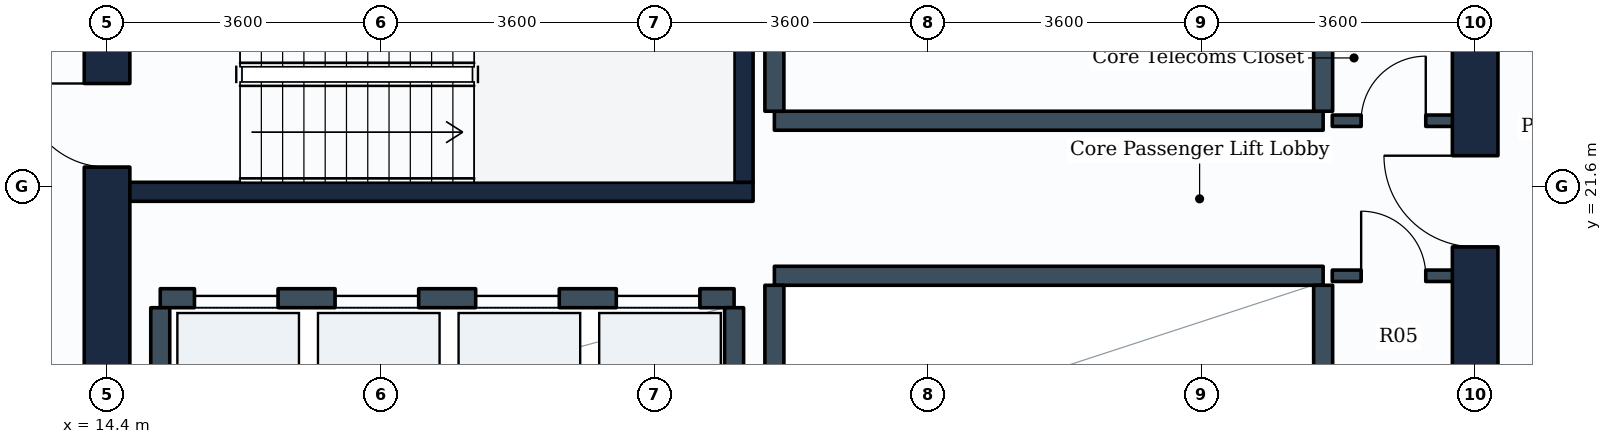
"""IFC4 building model, lengths in metres.
Left out: names, types, materials, properties, quantities, classifications, styles, units other than length and angle.
Written with IfcOpenShell. Run it as: python <this file> out.ifc"""

import sys

from ifc_helpers import new_model, si_unit, direction, frame, frame_2d, origin, place, context, subcontext, project, spatial, rectangle, extrude, element, fill, save


model = new_model("IFC4")
c1 = context("Model", 3, precision=1e-05, world=origin(), true_north=direction((0.0, 1.0)))
c2 = subcontext(c1, "Body", "Model", "MODEL_VIEW")
j1 = project(units=[si_unit("LENGTHUNIT", "METRE"), si_unit("PLANEANGLEUNIT", "RADIAN")], contexts=[c1])
p1 = place(None, origin())
s1 = spatial("IfcSite", under=j1, at=p1, CompositionType="ELEMENT")
p2 = place(p1, origin())
s2 = spatial("IfcBuilding", under=s1, at=p2, CompositionType="ELEMENT")
p3 = place(p2, frame((0.0, 0.0, 47.4)))
s3 = spatial("IfcBuildingStorey", under=s2, at=p3, CompositionType="ELEMENT", Elevation=47.4)
p4 = place(p3, frame((14.4, 10.8, 0.0), z_axis=(0.0, 0.0, 1.0), x_axis=(0.0, 1.0, 0.0)))
e1 = element("IfcWall", 1, at=p4, inside=s3, PredefinedType="SHEAR", context=c2, shape_type="SweptSolid", body=[
    extrude(rectangle(XDim=14.4, YDim=0.6, at=frame_2d((7.2, 0.0))), origin(), (0.0, 0.0, 1.0), 3.65),
])
p5 = place(p4, frame((11.05, 0.0, 0.0)))
e2 = element("IfcOpeningElement", 2, at=p5, cuts=e1, PredefinedType="OPENING", context=c2, shape_type="SweptSolid", body=[
    extrude(rectangle(XDim=1.1, YDim=2.1, at=frame_2d((0.55, 1.05))), frame((0.0, 0.31, 0.0), z_axis=(0.0, -1.0, 0.0), x_axis=(1.0, 0.0, 0.0)), (0.0, 0.0, 1.0), 0.62),
])
p6 = place(p4, frame((4.9, 0.0, 0.0)))
e3 = element("IfcOpeningElement", 3, at=p6, cuts=e1, PredefinedType="OPENING", context=c2, shape_type="SweptSolid", body=[
    extrude(rectangle(XDim=1.2, YDim=2.1, at=frame_2d((0.6, 1.05))), frame((0.0, 0.31, 0.0), z_axis=(0.0, -1.0, 0.0), x_axis=(1.0, 0.0, 0.0)), (0.0, 0.0, 1.0), 0.62),
])
p7 = place(p3, frame((32.4, 10.8, 0.0), z_axis=(0.0, 0.0, 1.0), x_axis=(0.0, 1.0, 0.0)))
e4 = element("IfcWall", 4, at=p7, inside=s3, PredefinedType="SHEAR", context=c2, shape_type="SweptSolid", body=[
    extrude(rectangle(XDim=14.4, YDim=0.6, at=frame_2d((7.2, 0.0))), origin(), (0.0, 0.0, 1.0), 3.65),
])
p8 = place(p7, frame((4.35, 0.0, 0.0)))
e5 = element("IfcOpeningElement", 5, at=p8, cuts=e4, PredefinedType="OPENING", context=c2, shape_type="SweptSolid", body=[
    extrude(rectangle(XDim=1.2, YDim=2.1, at=frame_2d((0.6, 1.05))), frame((0.0, 0.31, 0.0), z_axis=(0.0, -1.0, 0.0), x_axis=(1.0, 0.0, 0.0)), (0.0, 0.0, 1.0), 0.62),
])
p9 = place(p7, frame((10.0, 0.0, 0.0)))
e6 = element("IfcOpeningElement", 6, at=p9, cuts=e4, PredefinedType="OPENING", context=c2, shape_type="SweptSolid", body=[
    extrude(rectangle(XDim=1.2, YDim=2.1, at=frame_2d((0.6, 1.05))), frame((0.0, 0.31, 0.0), z_axis=(0.0, -1.0, 0.0), x_axis=(1.0, 0.0, 0.0)), (0.0, 0.0, 1.0), 0.62),
])
p10 = place(p3, frame((14.7, 21.525, 0.0), z_axis=(0.0, 0.0, 1.0), x_axis=(1.0, 0.0, 0.0)))
e7 = element("IfcWall", 7, at=p10, inside=s3, PredefinedType="SHEAR", context=c2, shape_type="SweptSolid", body=[
    extrude(rectangle(XDim=8.2, YDim=0.25, at=frame_2d((4.1, 0.0))), origin(), (0.0, 0.0, 1.0), 3.65),
])
p11 = place(p3, frame((22.775, 21.65, 0.0), z_axis=(0.0, 0.0, 1.0), x_axis=(0.0, 1.0, 0.0)))
e8 = element("IfcWall", 8, at=p11, inside=s3, PredefinedType="SHEAR", context=c2, shape_type="SweptSolid", body=[
    extrude(rectangle(XDim=2.84, YDim=0.25, at=frame_2d((1.42, 0.0))), origin(), (0.0, 0.0, 1.0), 3.65),
])
p12 = place(p3, frame((15.1, 20.125, 0.0), z_axis=(0.0, 0.0, 1.0), x_axis=(1.0, 0.0, 0.0)))
e9 = element("IfcWall", 9, at=p12, inside=s3, PredefinedType="PARTITIONING", context=c2, shape_type="SweptSolid", body=[
    extrude(rectangle(XDim=7.55, YDim=0.25, at=frame_2d((3.775, 0.0))), origin(), (0.0, 0.0, 1.0), 3.635),
])
p13 = place(p12, frame((0.45, 0.0, 0.0)))
e10 = element("IfcOpeningElement", 10, at=p13, cuts=e9, PredefinedType="OPENING", context=c2, shape_type="SweptSolid", body=[
    extrude(rectangle(XDim=1.1, YDim=2.1, at=frame_2d((0.55, 1.05))), frame((0.0, 0.135, 0.0), z_axis=(0.0, -1.0, 0.0), x_axis=(1.0, 0.0, 0.0)), (0.0, 0.0, 1.0), 0.27),
])
p14 = place(p12, frame((2.3, 0.0, 0.0)))
e11 = element("IfcOpeningElement", 11, at=p14, cuts=e9, PredefinedType="OPENING", context=c2, shape_type="SweptSolid", body=[
    extrude(rectangle(XDim=1.1, YDim=2.1, at=frame_2d((0.55, 1.05))), frame((0.0, 0.135, 0.0), z_axis=(0.0, -1.0, 0.0), x_axis=(1.0, 0.0, 0.0)), (0.0, 0.0, 1.0), 0.27),
])
p15 = place(p12, frame((4.15, 0.0, 0.0)))
e12 = element("IfcOpeningElement", 12, at=p15, cuts=e9, PredefinedType="OPENING", context=c2, shape_type="SweptSolid", body=[
    extrude(rectangle(XDim=1.1, YDim=2.1, at=frame_2d((0.55, 1.05))), frame((0.0, 0.135, 0.0), z_axis=(0.0, -1.0, 0.0), x_axis=(1.0, 0.0, 0.0)), (0.0, 0.0, 1.0), 0.27),
])
p16 = place(p12, frame((6.0, 0.0, 0.0)))
e13 = element("IfcOpeningElement", 13, at=p16, cuts=e9, PredefinedType="OPENING", context=c2, shape_type="SweptSolid", body=[
    extrude(rectangle(XDim=1.1, YDim=2.1, at=frame_2d((0.55, 1.05))), frame((0.0, 0.135, 0.0), z_axis=(0.0, -1.0, 0.0), x_axis=(1.0, 0.0, 0.0)), (0.0, 0.0, 1.0), 0.27),
])
for number, where, z_axis, x_axis in (
    (14, (15.1, 18.025, 0.0), (0.0, 0.0, 1.0), (0.0, 1.0, 0.0)),
    (15, (22.65, 18.025, 0.0), (0.0, 0.0, 1.0), (0.0, 1.0, 0.0)),
):
    element("IfcWall", number, at=place(p3, frame(where, z_axis=z_axis, x_axis=x_axis)), inside=s3, PredefinedType="PARTITIONING", context=c2, shape_type="SweptSolid", body=[
        extrude(rectangle(XDim=1.975, YDim=0.25, at=frame_2d((0.988, 0.0))), origin(), (0.0, 0.0, 1.0), 3.635),
    ])
p17 = place(p3, frame((23.18, 20.42, 0.0), z_axis=(0.0, 0.0, 1.0), x_axis=(1.0, 0.0, 0.0)))
e16 = element("IfcWall", 16, at=p17, inside=s3, PredefinedType="PARTITIONING", context=c2, shape_type="SweptSolid", body=[
    extrude(rectangle(XDim=7.22, YDim=0.25, at=frame_2d((3.61, 0.0))), origin(), (0.0, 0.0, 1.0), 3.635),
])
for number, where, z_axis, x_axis in (
    (17, (23.18, 18.025, 0.0), (0.0, 0.0, 1.0), (0.0, 1.0, 0.0)),
    (18, (30.4, 18.025, 0.0), (0.0, 0.0, 1.0), (0.0, 1.0, 0.0)),
):
    element("IfcWall", number, at=place(p3, frame(where, z_axis=z_axis, x_axis=x_axis)), inside=s3, PredefinedType="PARTITIONING", context=c2, shape_type="SweptSolid", body=[
        extrude(rectangle(XDim=2.27, YDim=0.25, at=frame_2d((1.135, 0.0))), origin(), (0.0, 0.0, 1.0), 3.635),
    ])
p18 = place(p3, frame((23.18, 22.46, 0.0), z_axis=(0.0, 0.0, 1.0), x_axis=(1.0, 0.0, 0.0)))
e19 = element("IfcWall", 19, at=p18, inside=s3, PredefinedType="PARTITIONING", context=c2, shape_type="SweptSolid", body=[
    extrude(rectangle(XDim=7.22, YDim=0.25, at=frame_2d((3.61, 0.0))), origin(), (0.0, 0.0, 1.0), 3.635),
])
for number, where, z_axis, x_axis in (
    (20, (23.18, 22.585, 0.0), (0.0, 0.0, 1.0), (0.0, 1.0, 0.0)),
    (21, (30.4, 22.585, 0.0), (0.0, 0.0, 1.0), (0.0, 1.0, 0.0)),
):
    element("IfcWall", number, at=place(p3, frame(where, z_axis=z_axis, x_axis=x_axis)), inside=s3, PredefinedType="PARTITIONING", context=c2, shape_type="SweptSolid", body=[
        extrude(rectangle(XDim=2.315, YDim=0.25, at=frame_2d((1.157, 0.0))), origin(), (0.0, 0.0, 1.0), 3.635),
    ])
p19 = place(p3, frame((30.52, 22.46, 0.0), z_axis=(0.0, 0.0, 1.0), x_axis=(1.0, 0.0, 0.0)))
e22 = element("IfcWall", 22, at=p19, inside=s3, PredefinedType="PARTITIONING", context=c2, shape_type="SweptSolid", body=[
    extrude(rectangle(XDim=1.63, YDim=0.15, at=frame_2d((0.815, 0.0))), origin(), (0.0, 0.0, 1.0), 3.635),
])
p20 = place(p19, frame((0.38, 0.0, 0.0)))
e23 = element("IfcOpeningElement", 23, at=p20, cuts=e22, PredefinedType="OPENING", context=c2, shape_type="SweptSolid", body=[
    extrude(rectangle(XDim=0.85, YDim=2.1, at=frame_2d((0.425, 1.05))), frame((0.0, 0.085, 0.0), z_axis=(0.0, -1.0, 0.0), x_axis=(1.0, 0.0, 0.0)), (0.0, 0.0, 1.0), 0.17),
])
p21 = place(p3, frame((30.52, 20.42, 0.0), z_axis=(0.0, 0.0, 1.0), x_axis=(1.0, 0.0, 0.0)))
e24 = element("IfcWall", 24, at=p21, inside=s3, PredefinedType="PARTITIONING", context=c2, shape_type="SweptSolid", body=[
    extrude(rectangle(XDim=1.63, YDim=0.15, at=frame_2d((0.815, 0.0))), origin(), (0.0, 0.0, 1.0), 3.635),
])
p22 = place(p21, frame((0.38, 0.0, 0.0)))
e25 = element("IfcOpeningElement", 25, at=p22, cuts=e24, PredefinedType="OPENING", context=c2, shape_type="SweptSolid", body=[
    extrude(rectangle(XDim=0.85, YDim=2.1, at=frame_2d((0.425, 1.05))), frame((0.0, 0.085, 0.0), z_axis=(0.0, -1.0, 0.0), x_axis=(1.0, 0.0, 0.0)), (0.0, 0.0, 1.0), 0.17),
])
p23 = place(p5, origin())
e26 = element("IfcDoor", 26, at=p23, inside=s3, OperationType="SINGLE_SWING_RIGHT", PredefinedType="DOOR", context=c2, shape_type="SweptSolid", body=[
    extrude(rectangle(XDim=1.1, YDim=2.1, at=frame_2d((0.55, 1.05))), frame((0.0, 0.025, 0.0), z_axis=(0.0, -1.0, 0.0), x_axis=(1.0, 0.0, 0.0)), (0.0, 0.0, 1.0), 0.05),
])
fill(e2, e26)
p24 = place(p13, origin())
e27 = element("IfcDoor", 27, at=p24, inside=s3, OperationType="SLIDING_TO_LEFT", PredefinedType="DOOR", context=c2, shape_type="SweptSolid", body=[
    extrude(rectangle(XDim=1.1, YDim=2.1, at=frame_2d((0.55, 1.05))), frame((0.0, 0.025, 0.0), z_axis=(0.0, -1.0, 0.0), x_axis=(1.0, 0.0, 0.0)), (0.0, 0.0, 1.0), 0.05),
])
fill(e10, e27)
p25 = place(p14, origin())
e28 = element("IfcDoor", 28, at=p25, inside=s3, OperationType="SLIDING_TO_LEFT", PredefinedType="DOOR", context=c2, shape_type="SweptSolid", body=[
    extrude(rectangle(XDim=1.1, YDim=2.1, at=frame_2d((0.55, 1.05))), frame((0.0, 0.025, 0.0), z_axis=(0.0, -1.0, 0.0), x_axis=(1.0, 0.0, 0.0)), (0.0, 0.0, 1.0), 0.05),
])
fill(e11, e28)
p26 = place(p15, origin())
e29 = element("IfcDoor", 29, at=p26, inside=s3, OperationType="SLIDING_TO_LEFT", PredefinedType="DOOR", context=c2, shape_type="SweptSolid", body=[
    extrude(rectangle(XDim=1.1, YDim=2.1, at=frame_2d((0.55, 1.05))), frame((0.0, 0.025, 0.0), z_axis=(0.0, -1.0, 0.0), x_axis=(1.0, 0.0, 0.0)), (0.0, 0.0, 1.0), 0.05),
])
fill(e12, e29)
p27 = place(p16, origin())
e30 = element("IfcDoor", 30, at=p27, inside=s3, OperationType="SLIDING_TO_LEFT", PredefinedType="DOOR", context=c2, shape_type="SweptSolid", body=[
    extrude(rectangle(XDim=1.1, YDim=2.1, at=frame_2d((0.55, 1.05))), frame((0.0, 0.025, 0.0), z_axis=(0.0, -1.0, 0.0), x_axis=(1.0, 0.0, 0.0)), (0.0, 0.0, 1.0), 0.05),
])
fill(e13, e30)
p28 = place(p9, origin())
e31 = element("IfcDoor", 31, at=p28, inside=s3, OperationType="SINGLE_SWING_RIGHT", PredefinedType="DOOR", context=c2, shape_type="SweptSolid", body=[
    extrude(rectangle(XDim=1.2, YDim=2.1, at=frame_2d((0.6, 1.05))), frame((0.0, 0.025, 0.0), z_axis=(0.0, -1.0, 0.0), x_axis=(1.0, 0.0, 0.0)), (0.0, 0.0, 1.0), 0.05),
])
fill(e6, e31)
p29 = place(p20, origin())
e32 = element("IfcDoor", 32, at=p29, inside=s3, OperationType="SINGLE_SWING_RIGHT", PredefinedType="DOOR", context=c2, shape_type="SweptSolid", body=[
    extrude(rectangle(XDim=0.85, YDim=2.1, at=frame_2d((0.425, 1.05))), frame((0.0, 0.025, 0.0), z_axis=(0.0, -1.0, 0.0), x_axis=(1.0, 0.0, 0.0)), (0.0, 0.0, 1.0), 0.05),
])
fill(e23, e32)
p30 = place(p22, origin())
e33 = element("IfcDoor", 33, at=p30, inside=s3, OperationType="SINGLE_SWING_LEFT", PredefinedType="DOOR", context=c2, shape_type="SweptSolid", body=[
    extrude(rectangle(XDim=0.85, YDim=2.1, at=frame_2d((0.425, 1.05))), frame((0.0, 0.025, 0.0), z_axis=(0.0, -1.0, 0.0), x_axis=(1.0, 0.0, 0.0)), (0.0, 0.0, 1.0), 0.05),
])
fill(e25, e33)
save(model, sys.argv[1])
